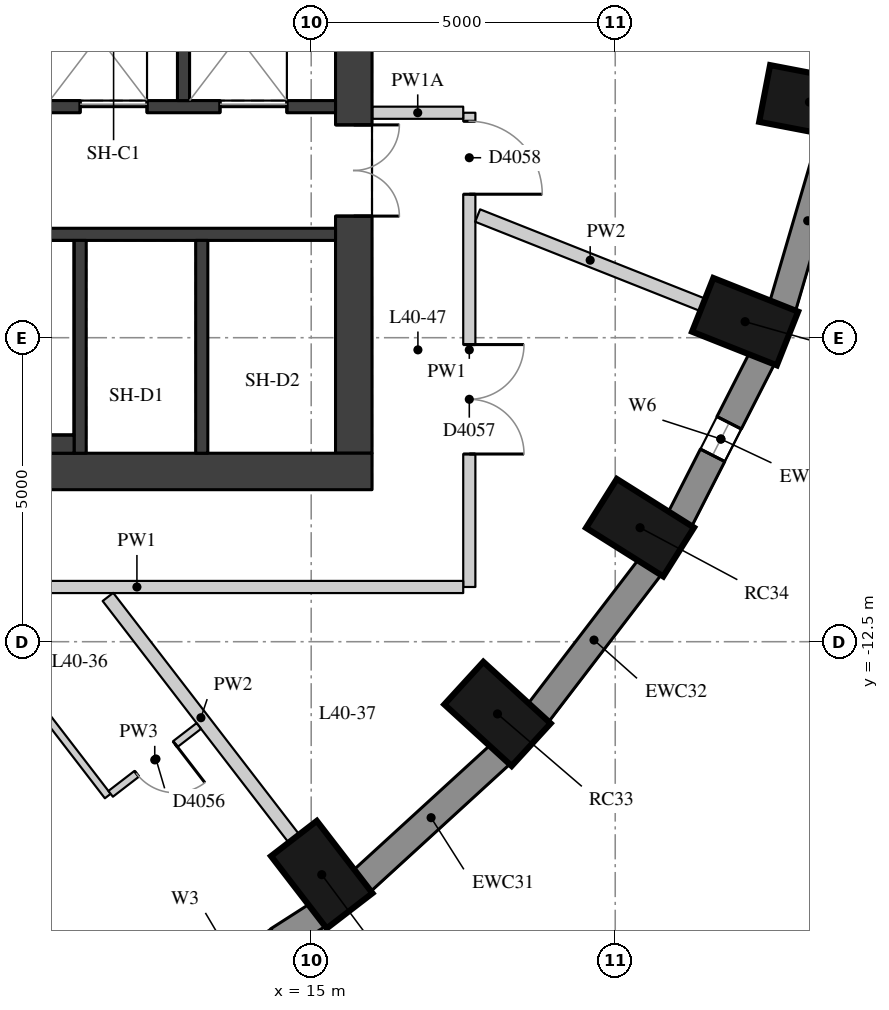
"""IFC4 building model, lengths in metres.
Left out: names, types, materials, properties, quantities, classifications, styles, units other than length and angle.
Written with IfcOpenShell. Run it as: python <this file> out.ifc"""

import sys

from ifc_helpers import new_model, si_unit, direction, frame, frame_2d, origin, origin_2d, place, context, subcontext, project, spatial, rectangle, extrude, element, fill, save


model = new_model("IFC4")
c1 = context("Model", 3, precision=1e-05, world=origin(), true_north=direction((0.0, 1.0)))
c2 = subcontext(c1, "Body", "Model", "MODEL_VIEW")
j1 = project(units=[si_unit("LENGTHUNIT", "METRE"), si_unit("PLANEANGLEUNIT", "RADIAN")], contexts=[c1])
p1 = place(None, origin())
s1 = spatial("IfcSite", under=j1, at=p1, CompositionType="ELEMENT")
p2 = place(p1, origin())
s2 = spatial("IfcBuilding", under=s1, at=p2, CompositionType="ELEMENT")
p3 = place(p2, frame((0.0, 0.0, 145.1)))
s3 = spatial("IfcBuildingStorey", under=s2, at=p3, CompositionType="ELEMENT", Elevation=145.1)
for number, where, z_axis, x_axis in (
    (1, (15.173, -16.332, 0.0), (0.0, 0.0, 1.0), (0.61, -0.792, 0.0)),
    (2, (18.064, -13.688, 0.0), (0.0, 0.0, 1.0), (0.738, -0.675, 0.0)),
    (3, (20.408, -10.625, 0.0), (0.0, 0.0, 1.0), (0.846, -0.533, 0.0)),
    (4, (22.136, -7.236, 0.0), (0.0, 0.0, 1.0), (0.93, -0.369, 0.0)),
    (5, (23.194, -3.625, 0.0), (0.0, 0.0, 1.0), (0.982, -0.189, 0.0)),
):
    element("IfcColumn", number, at=place(p3, frame(where, z_axis=z_axis, x_axis=x_axis)), inside=s3, PredefinedType="COLUMN", context=c2, shape_type="SweptSolid", body=[
        extrude(rectangle(XDim=1.5, YDim=0.95, at=origin_2d()), origin(), (0.0, 0.0, 1.0), 3.3),
    ])
p4 = place(p3, frame((12.455, -18.693, 0.0), z_axis=(0.0, 0.0, 1.0), x_axis=(0.842065914439, 0.539374633943, 0.0)))
e6 = element("IfcWall", 6, at=p4, inside=s3, PredefinedType="SOLIDWALL", context=c2, shape_type="SweptSolid", body=[
    extrude(rectangle(XDim=3.151, YDim=0.45, at=frame_2d((1.576, 0.0))), origin(), (0.0, 0.0, 1.0), 3.02),
])
p5 = place(p4, frame((0.776, 0.0, 0.4)))
e7 = element("IfcOpeningElement", 7, at=p5, cuts=e6, PredefinedType="OPENING", context=c2, shape_type="SweptSolid", body=[
    extrude(rectangle(XDim=1.6, YDim=1.75, at=frame_2d((0.8, 0.875))), frame((0.0, 0.235, 0.0), z_axis=(0.0, -1.0, 0.0), x_axis=(1.0, 0.0, 0.0)), (0.0, 0.0, 1.0), 0.47),
])
p6 = place(p3, frame((15.83, -16.439, 0.0), z_axis=(0.0, 0.0, 1.0), x_axis=(0.737808755941, 0.675009807082, 0.0)))
e8 = element("IfcWall", 8, at=p6, inside=s3, PredefinedType="SOLIDWALL", context=c2, shape_type="SweptSolid", body=[
    extrude(rectangle(XDim=3.094, YDim=0.45, at=frame_2d((1.547, 0.0))), origin(), (0.0, 0.0, 1.0), 3.02),
])
p7 = place(p3, frame((18.728, -13.679, 0.0), z_axis=(0.0, 0.0, 1.0), x_axis=(0.607817056371, 0.794077090706, 0.0)))
e9 = element("IfcWall", 9, at=p7, inside=s3, PredefinedType="SOLIDWALL", context=c2, shape_type="SweptSolid", body=[
    extrude(rectangle(XDim=3.037, YDim=0.45, at=frame_2d((1.519, 0.0))), origin(), (0.0, 0.0, 1.0), 3.02),
])
p8 = place(p3, frame((21.059, -10.497, 0.0), z_axis=(0.0, 0.0, 1.0), x_axis=(0.454133999889, 0.890933392653, 0.0)))
e10 = element("IfcWall", 10, at=p8, inside=s3, PredefinedType="SOLIDWALL", context=c2, shape_type="SweptSolid", body=[
    extrude(rectangle(XDim=2.986, YDim=0.45, at=frame_2d((1.493, 0.0))), origin(), (0.0, 0.0, 1.0), 3.02),
])
p9 = place(p8, frame((1.193, 0.0, 0.4)))
e11 = element("IfcOpeningElement", 11, at=p9, cuts=e10, PredefinedType="OPENING", context=c2, shape_type="SweptSolid", body=[
    extrude(rectangle(XDim=0.6, YDim=1.75, at=frame_2d((0.3, 0.875))), frame((0.0, 0.235, 0.0), z_axis=(0.0, -1.0, 0.0), x_axis=(1.0, 0.0, 0.0)), (0.0, 0.0, 1.0), 0.47),
])
p10 = place(p3, frame((22.751, -6.991, 0.0), z_axis=(0.0, 0.0, 1.0), x_axis=(0.281049481624, 0.959693278542, 0.0)))
e12 = element("IfcWall", 12, at=p10, inside=s3, PredefinedType="SOLIDWALL", context=c2, shape_type="SweptSolid", body=[
    extrude(rectangle(XDim=2.948, YDim=0.45, at=frame_2d((1.474, 0.0))), origin(), (0.0, 0.0, 1.0), 3.02),
])
p11 = place(p3, frame((15.7, -9.4, 0.0), z_axis=(0.0, 0.0, 1.0), x_axis=(0.0, 1.0, 0.0)))
e13 = element("IfcWall", 13, at=p11, inside=s3, PredefinedType="SHEAR", context=c2, shape_type="SweptSolid", body=[
    extrude(rectangle(XDim=18.8, YDim=0.6, at=frame_2d((9.4, 0.0))), origin(), (0.0, 0.0, 1.0), 3.02),
])
p12 = place(p11, frame((13.4, 0.0, 0.0)))
e14 = element("IfcOpeningElement", 14, at=p12, cuts=e13, PredefinedType="OPENING", context=c2, shape_type="SweptSolid", body=[
    extrude(rectangle(XDim=1.5, YDim=2.1, at=frame_2d((0.75, 1.05))), frame((0.0, 0.31, 0.0), z_axis=(0.0, -1.0, 0.0), x_axis=(1.0, 0.0, 0.0)), (0.0, 0.0, 1.0), 0.62),
])
p13 = place(p11, frame((3.9, 0.0, 0.0)))
e15 = element("IfcOpeningElement", 15, at=p13, cuts=e13, PredefinedType="OPENING", context=c2, shape_type="SweptSolid", body=[
    extrude(rectangle(XDim=1.5, YDim=2.1, at=frame_2d((0.75, 1.05))), frame((0.0, 0.31, 0.0), z_axis=(0.0, -1.0, 0.0), x_axis=(1.0, 0.0, 0.0)), (0.0, 0.0, 1.0), 0.62),
])
p14 = place(p3, frame((4.0, -9.7, 0.0), z_axis=(0.0, 0.0, 1.0), x_axis=(1.0, 0.0, 0.0)))
e16 = element("IfcWall", 16, at=p14, inside=s3, PredefinedType="SHEAR", context=c2, shape_type="SweptSolid", body=[
    extrude(rectangle(XDim=12.0, YDim=0.6, at=frame_2d((6.0, 0.0))), origin(), (0.0, 0.0, 1.0), 3.02),
])
p15 = place(p3, frame((4.6, -3.7, 0.0), z_axis=(0.0, 0.0, 1.0), x_axis=(1.0, 0.0, 0.0)))
e17 = element("IfcWall", 17, at=p15, inside=s3, PredefinedType="SHEAR", context=c2, shape_type="SweptSolid", body=[
    extrude(rectangle(XDim=10.8, YDim=0.2, at=frame_2d((5.4, 0.0))), origin(), (0.0, 0.0, 1.0), 3.02),
])
p16 = place(p15, frame((6.6, 0.0, 0.0)))
e18 = element("IfcOpeningElement", 18, at=p16, cuts=e17, PredefinedType="OPENING", context=c2, shape_type="SweptSolid", body=[
    extrude(rectangle(XDim=1.1, YDim=2.1, at=frame_2d((0.55, 1.05))), frame((0.0, 0.11, 0.0), z_axis=(0.0, -1.0, 0.0), x_axis=(1.0, 0.0, 0.0)), (0.0, 0.0, 1.0), 0.22),
])
p17 = place(p15, frame((8.9, 0.0, 0.0)))
e19 = element("IfcOpeningElement", 19, at=p17, cuts=e17, PredefinedType="OPENING", context=c2, shape_type="SweptSolid", body=[
    extrude(rectangle(XDim=1.1, YDim=2.1, at=frame_2d((0.55, 1.05))), frame((0.0, 0.11, 0.0), z_axis=(0.0, -1.0, 0.0), x_axis=(1.0, 0.0, 0.0)), (0.0, 0.0, 1.0), 0.22),
])
p18 = place(p3, frame((4.6, -5.8, 0.0), z_axis=(0.0, 0.0, 1.0), x_axis=(1.0, 0.0, 0.0)))
e20 = element("IfcWall", 20, at=p18, inside=s3, PredefinedType="SHEAR", context=c2, shape_type="SweptSolid", body=[
    extrude(rectangle(XDim=10.8, YDim=0.2, at=frame_2d((5.4, 0.0))), origin(), (0.0, 0.0, 1.0), 3.02),
])
for number, where, z_axis, x_axis in (
    (21, (11.2, -9.4, 0.0), (0.0, 0.0, 1.0), (0.0, 1.0, 0.0)),
    (22, (13.2, -9.4, 0.0), (0.0, 0.0, 1.0), (0.0, 1.0, 0.0)),
):
    element("IfcWall", number, at=place(p3, frame(where, z_axis=z_axis, x_axis=x_axis)), inside=s3, PredefinedType="SHEAR", context=c2, shape_type="SweptSolid", body=[
        extrude(rectangle(XDim=3.5, YDim=0.2, at=frame_2d((1.75, 0.0))), origin(), (0.0, 0.0, 1.0), 3.02),
    ])
p19 = place(p3, frame((12.9, -3.6, 0.0), z_axis=(0.0, 0.0, 1.0), x_axis=(0.0, 1.0, 0.0)))
e23 = element("IfcWall", 23, at=p19, inside=s3, PredefinedType="SHEAR", context=c2, shape_type="SweptSolid", body=[
    extrude(rectangle(XDim=2.5, YDim=0.2, at=frame_2d((1.25, 0.0))), origin(), (0.0, 0.0, 1.0), 3.02),
])
p20 = place(p3, frame((6.22, -9.25, 0.0), z_axis=(0.0, 0.0, 1.0), x_axis=(1.0, 0.0, 0.0)))
e24 = element("IfcWall", 24, at=p20, inside=s3, PredefinedType="PARTITIONING", context=c2, shape_type="SweptSolid", body=[
    extrude(rectangle(XDim=4.88, YDim=0.3, at=frame_2d((2.44, 0.0))), origin(), (0.0, 0.0, 1.0), 3.02),
])
p21 = place(p3, frame((17.6, -3.8, 0.0), z_axis=(0.0, 0.0, 1.0), x_axis=(0.0, -1.0, 0.0)))
e25 = element("IfcWall", 25, at=p21, inside=s3, PredefinedType="PARTITIONING", context=c2, shape_type="SweptSolid", body=[
    extrude(rectangle(XDim=7.8, YDim=0.2, at=frame_2d((3.9, 0.0))), origin(), (0.0, 0.0, 1.0), 3.02),
])
p22 = place(p21, frame((3.813, 0.0, 0.0)))
e26 = element("IfcOpeningElement", 26, at=p22, cuts=e25, PredefinedType="OPENING", context=c2, shape_type="SweptSolid", body=[
    extrude(rectangle(XDim=1.8, YDim=2.1, at=frame_2d((0.9, 1.05))), frame((0.0, 0.11, 0.0), z_axis=(0.0, -1.0, 0.0), x_axis=(1.0, 0.0, 0.0)), (0.0, 0.0, 1.0), 0.22),
])
p23 = place(p21, frame((0.14, 0.0, 0.0)))
e27 = element("IfcOpeningElement", 27, at=p23, cuts=e25, PredefinedType="OPENING", context=c2, shape_type="SweptSolid", body=[
    extrude(rectangle(XDim=1.2, YDim=2.1, at=frame_2d((0.6, 1.05))), frame((0.0, 0.11, 0.0), z_axis=(0.0, -1.0, 0.0), x_axis=(1.0, 0.0, 0.0)), (0.0, 0.0, 1.0), 0.22),
])
p24 = place(p3, frame((17.5, -11.6, 0.0), z_axis=(0.0, 0.0, 1.0), x_axis=(-1.0, 0.0, 0.0)))
e28 = element("IfcWall", 28, at=p24, inside=s3, PredefinedType="PARTITIONING", context=c2, shape_type="SweptSolid", body=[
    extrude(rectangle(XDim=10.732, YDim=0.2, at=frame_2d((5.366, 0.0))), origin(), (0.0, 0.0, 1.0), 3.02),
])
p25 = place(p3, frame((16.004, -3.8, 0.0), z_axis=(0.0, 0.0, 1.0), x_axis=(1.0, 0.0, 0.0)))
e29 = element("IfcWall", 29, at=p25, inside=s3, PredefinedType="PARTITIONING", context=c2, shape_type="SweptSolid", body=[
    extrude(rectangle(XDim=1.496, YDim=0.2, at=frame_2d((0.748, 0.0))), origin(), (0.0, 0.0, 1.0), 2.57),
])
p26 = place(p3, frame((14.716, -15.737, 0.0), z_axis=(0.0, 0.0, 1.0), x_axis=(-0.609986007715, 0.792412184657, 0.0)))
e30 = element("IfcWall", 30, at=p26, inside=s3, PredefinedType="PARTITIONING", context=c2, shape_type="SweptSolid", body=[
    extrude(rectangle(XDim=5.015, YDim=0.22, at=frame_2d((2.507, 0.0))), origin(), (0.0, 0.0, 1.0), 3.02),
])
p27 = place(p3, frame((21.439, -6.96, 0.0), z_axis=(0.0, 0.0, 1.0), x_axis=(-0.929517399972, 0.368778257426, 0.0)))
e31 = element("IfcWall", 31, at=p27, inside=s3, PredefinedType="PARTITIONING", context=c2, shape_type="SweptSolid", body=[
    extrude(rectangle(XDim=3.982, YDim=0.22, at=frame_2d((1.991, 0.0))), origin(), (0.0, 0.0, 1.0), 3.02),
])
p28 = place(p3, frame((9.109, -11.732, 0.0), z_axis=(0.0, 0.0, 1.0), x_axis=(0.609996270026, -0.79240428479, 0.0)))
e32 = element("IfcWall", 32, at=p28, inside=s3, PredefinedType="PARTITIONING", context=c2, shape_type="SweptSolid", body=[
    extrude(rectangle(XDim=4.173, YDim=0.12, at=frame_2d((2.087, 0.0))), origin(), (0.0, 0.0, 1.0), 3.02),
])
p29 = place(p3, frame((11.702, -15.002, 0.0), z_axis=(0.0, 0.0, 1.0), x_axis=(0.792395776304, 0.610007322657, 0.0)))
e33 = element("IfcWall", 33, at=p29, inside=s3, PredefinedType="PARTITIONING", context=c2, shape_type="SweptSolid", body=[
    extrude(rectangle(XDim=1.83, YDim=0.12, at=frame_2d((0.915, 0.0))), origin(), (0.0, 0.0, 1.0), 3.02),
])
p30 = place(p29, frame((0.54, 0.0, 0.0)))
e34 = element("IfcOpeningElement", 34, at=p30, cuts=e33, PredefinedType="OPENING", context=c2, shape_type="SweptSolid", body=[
    extrude(rectangle(XDim=0.8, YDim=2.1, at=frame_2d((0.4, 1.05))), frame((0.0, 0.07, 0.0), z_axis=(0.0, -1.0, 0.0), x_axis=(1.0, 0.0, 0.0)), (0.0, 0.0, 1.0), 0.14),
])
p31 = place(p9, origin())
e35 = element("IfcWindow", 35, at=p31, inside=s3, PartitioningType="SINGLE_PANEL", PredefinedType="WINDOW", context=c2, shape_type="SweptSolid", body=[
    extrude(rectangle(XDim=0.6, YDim=1.75, at=frame_2d((0.3, 0.875))), frame((0.0, 0.035, 0.0), z_axis=(0.0, -1.0, 0.0), x_axis=(1.0, 0.0, 0.0)), (0.0, 0.0, 1.0), 0.06),
])
fill(e11, e35)
p32 = place(p13, origin())
e36 = element("IfcDoor", 36, at=p32, inside=s3, OperationType="DOUBLE_DOOR_SINGLE_SWING", PredefinedType="DOOR", context=c2, shape_type="SweptSolid", body=[
    extrude(rectangle(XDim=1.5, YDim=2.1, at=frame_2d((0.75, 1.05))), frame((0.0, 0.025, 0.0), z_axis=(0.0, -1.0, 0.0), x_axis=(1.0, 0.0, 0.0)), (0.0, 0.0, 1.0), 0.05),
])
fill(e15, e36)
p33 = place(p16, origin())
e37 = element("IfcDoor", 37, at=p33, inside=s3, OperationType="DOUBLE_DOOR_SLIDING", PredefinedType="DOOR", context=c2, shape_type="SweptSolid", body=[
    extrude(rectangle(XDim=1.1, YDim=2.1, at=frame_2d((0.55, 1.05))), frame((0.0, 0.025, 0.0), z_axis=(0.0, -1.0, 0.0), x_axis=(1.0, 0.0, 0.0)), (0.0, 0.0, 1.0), 0.05),
])
fill(e18, e37)
p34 = place(p17, origin())
e38 = element("IfcDoor", 38, at=p34, inside=s3, OperationType="DOUBLE_DOOR_SLIDING", PredefinedType="DOOR", context=c2, shape_type="SweptSolid", body=[
    extrude(rectangle(XDim=1.1, YDim=2.1, at=frame_2d((0.55, 1.05))), frame((0.0, 0.025, 0.0), z_axis=(0.0, -1.0, 0.0), x_axis=(1.0, 0.0, 0.0)), (0.0, 0.0, 1.0), 0.05),
])
fill(e19, e38)
p35 = place(p30, origin())
e39 = element("IfcDoor", 39, at=p35, inside=s3, OperationType="SINGLE_SWING_LEFT", PredefinedType="DOOR", context=c2, shape_type="SweptSolid", body=[
    extrude(rectangle(XDim=0.8, YDim=2.1, at=frame_2d((0.4, 1.05))), frame((0.0, 0.025, 0.0), z_axis=(0.0, -1.0, 0.0), x_axis=(1.0, 0.0, 0.0)), (0.0, 0.0, 1.0), 0.05),
])
fill(e34, e39)
p36 = place(p22, origin())
e40 = element("IfcDoor", 40, at=p36, inside=s3, OperationType="DOUBLE_DOOR_SINGLE_SWING", PredefinedType="DOOR", context=c2, shape_type="SweptSolid", body=[
    extrude(rectangle(XDim=1.8, YDim=2.1, at=frame_2d((0.9, 1.05))), frame((0.0, 0.025, 0.0), z_axis=(0.0, -1.0, 0.0), x_axis=(1.0, 0.0, 0.0)), (0.0, 0.0, 1.0), 0.05),
])
fill(e26, e40)
p37 = place(p23, origin())
e41 = element("IfcDoor", 41, at=p37, inside=s3, OperationType="SINGLE_SWING_RIGHT", PredefinedType="DOOR", context=c2, shape_type="SweptSolid", body=[
    extrude(rectangle(XDim=1.2, YDim=2.1, at=frame_2d((0.6, 1.05))), frame((0.0, 0.025, 0.0), z_axis=(0.0, -1.0, 0.0), x_axis=(1.0, 0.0, 0.0)), (0.0, 0.0, 1.0), 0.05),
])
fill(e27, e41)
save(model, sys.argv[1])
